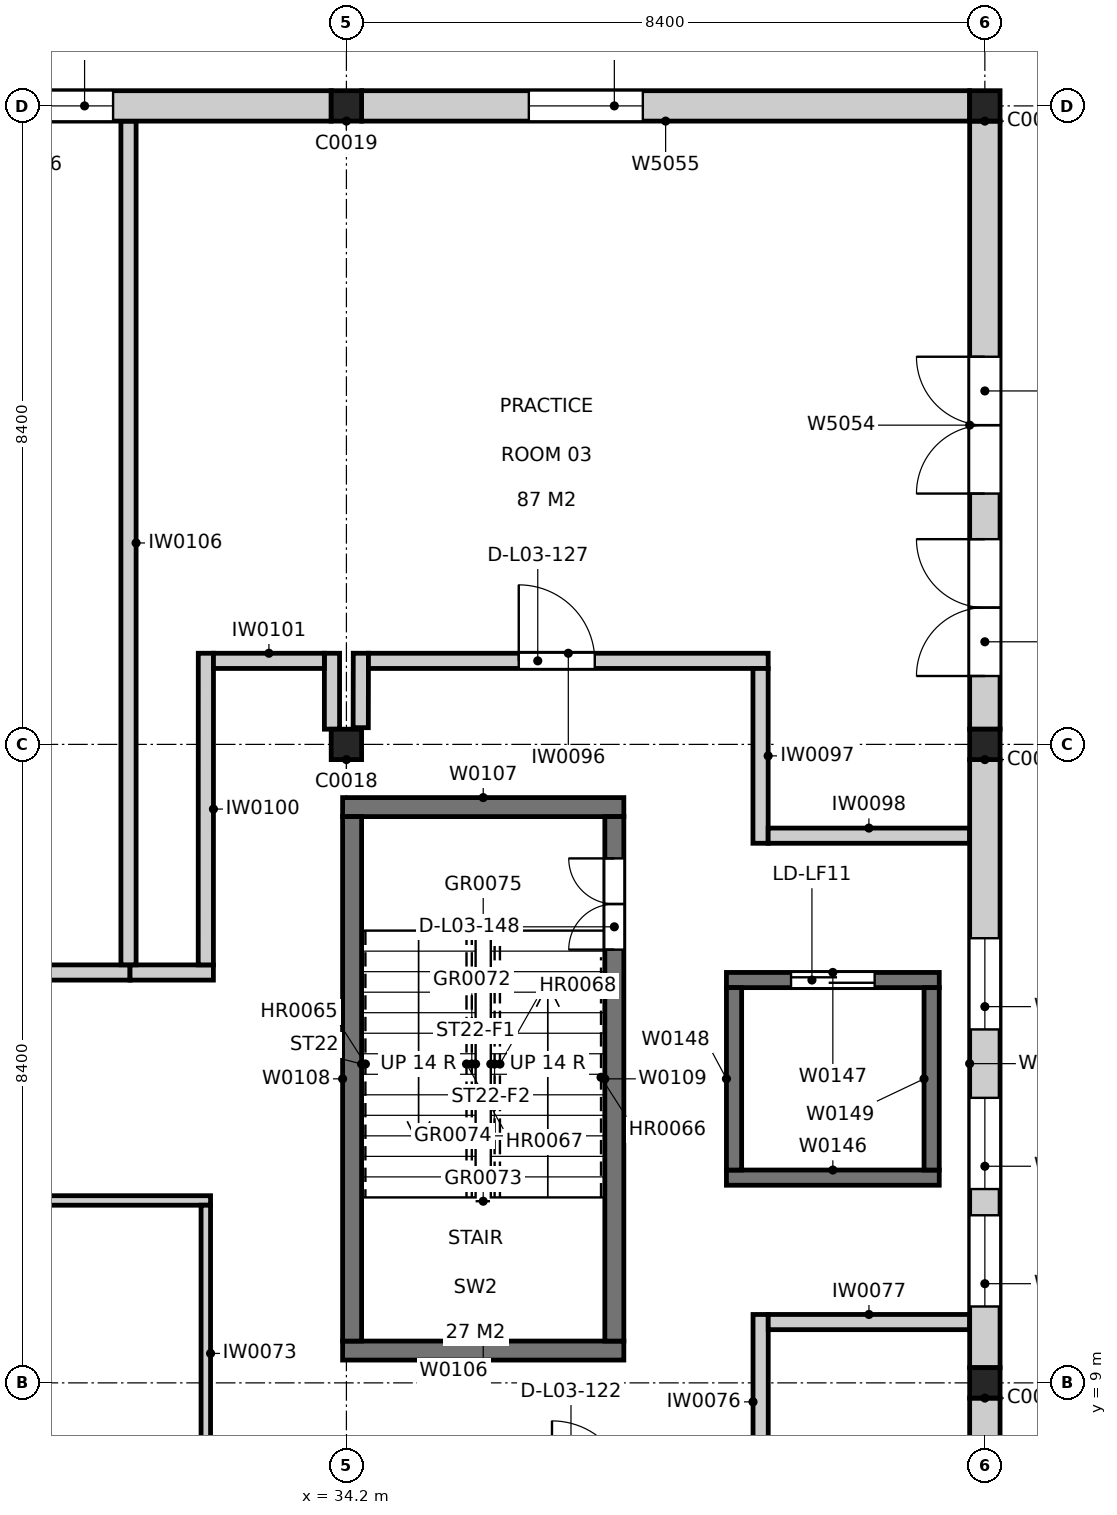
"""IFC4 building model, lengths in metres.
Left out: names, types, materials, properties, quantities, classifications, styles, units other than length and angle.
Written with IfcOpenShell. Run it as: python <this file> out.ifc"""

import sys

from ifc_helpers import new_model, si_unit, direction, frame, frame_2d, origin, origin_2d, place, context, subcontext, project, spatial, rectangle, extrude, element, fill, save


model = new_model("IFC4")
c1 = context("Model", 3, precision=1e-05, world=origin(), true_north=direction((0.0, 1.0)))
c2 = subcontext(c1, "Body", "Model", "MODEL_VIEW")
j1 = project(units=[si_unit("LENGTHUNIT", "METRE"), si_unit("PLANEANGLEUNIT", "RADIAN")], contexts=[c1])
p1 = place(None, origin())
s1 = spatial("IfcSite", under=j1, at=p1, CompositionType="ELEMENT")
p2 = place(p1, origin())
s2 = spatial("IfcBuilding", under=s1, at=p2, CompositionType="ELEMENT")
p3 = place(p2, frame((0.0, 0.0, 14.4)))
s3 = spatial("IfcBuildingStorey", under=s2, at=p3, CompositionType="ELEMENT", Elevation=14.4)
for number, where, z_axis, x_axis in (
    (1, (34.2, 17.4, 0.0), (0.0, 0.0, 1.0), (1.0, 0.0, 0.0)),
    (2, (34.2, 25.8, 0.0), (0.0, 0.0, 1.0), (1.0, 0.0, 0.0)),
    (3, (42.6, 9.0, 0.0), (0.0, 0.0, 1.0), (1.0, 0.0, 0.0)),
    (4, (42.6, 17.4, 0.0), (0.0, 0.0, 1.0), (1.0, 0.0, 0.0)),
    (5, (42.6, 25.8, 0.0), (0.0, 0.0, 1.0), (1.0, 0.0, 0.0)),
):
    element("IfcColumn", number, at=place(p3, frame(where, z_axis=z_axis, x_axis=x_axis)), inside=s3, PredefinedType="COLUMN", context=c2, shape_type="SweptSolid", body=[
        extrude(rectangle(XDim=0.4, YDim=0.4, at=origin_2d()), origin(), (0.0, 0.0, 1.0), 4.8),
    ])
for number, where, z_axis, x_axis in (
    (6, (34.15, 9.425, 0.0), (0.0, 0.0, 1.0), (1.0, 0.0, 0.0)),
    (7, (34.15, 16.575, 0.0), (0.0, 0.0, 1.0), (1.0, 0.0, 0.0)),
):
    element("IfcWall", number, at=place(p3, frame(where, z_axis=z_axis, x_axis=x_axis)), inside=s3, PredefinedType="SOLIDWALL", context=c2, shape_type="SweptSolid", body=[
        extrude(rectangle(XDim=3.7, YDim=0.25, at=frame_2d((1.85, 0.0))), origin(), (0.0, 0.0, 1.0), 4.8),
    ])
p4 = place(p3, frame((34.275, 9.55, 0.0), z_axis=(0.0, 0.0, 1.0), x_axis=(0.0, 1.0, 0.0)))
e8 = element("IfcWall", 8, at=p4, inside=s3, PredefinedType="SOLIDWALL", context=c2, shape_type="SweptSolid", body=[
    extrude(rectangle(XDim=6.9, YDim=0.25, at=frame_2d((3.45, 0.0))), origin(), (0.0, 0.0, 1.0), 4.8),
])
p5 = place(p3, frame((37.725, 9.55, 0.0), z_axis=(0.0, 0.0, 1.0), x_axis=(0.0, 1.0, 0.0)))
e9 = element("IfcWall", 9, at=p5, inside=s3, PredefinedType="SOLIDWALL", context=c2, shape_type="SweptSolid", body=[
    extrude(rectangle(XDim=6.9, YDim=0.25, at=frame_2d((3.45, 0.0))), origin(), (0.0, 0.0, 1.0), 4.8),
])
p6 = place(p5, frame((5.15, 0.0, 0.0)))
e10 = element("IfcOpeningElement", 10, at=p6, cuts=e9, PredefinedType="OPENING", context=c2, shape_type="SweptSolid", body=[
    extrude(rectangle(XDim=1.2, YDim=2.1, at=frame_2d((0.6, 1.05))), frame((0.0, 0.135, 0.0), z_axis=(0.0, -1.0, 0.0), x_axis=(1.0, 0.0, 0.0)), (0.0, 0.0, 1.0), 0.27),
])
p7 = place(p3, frame((39.2, 11.7, 0.0), z_axis=(0.0, 0.0, 1.0), x_axis=(1.0, 0.0, 0.0)))
e11 = element("IfcWall", 11, at=p7, inside=s3, PredefinedType="SOLIDWALL", context=c2, shape_type="SweptSolid", body=[
    extrude(rectangle(XDim=2.8, YDim=0.2, at=frame_2d((1.4, 0.0))), origin(), (0.0, 0.0, 1.0), 4.8),
])
p8 = place(p3, frame((39.2, 14.3, 0.0), z_axis=(0.0, 0.0, 1.0), x_axis=(1.0, 0.0, 0.0)))
e12 = element("IfcWall", 12, at=p8, inside=s3, PredefinedType="SOLIDWALL", context=c2, shape_type="SweptSolid", body=[
    extrude(rectangle(XDim=2.8, YDim=0.2, at=frame_2d((1.4, 0.0))), origin(), (0.0, 0.0, 1.0), 4.8),
])
p9 = place(p8, frame((0.85, 0.0, 0.0)))
e13 = element("IfcOpeningElement", 13, at=p9, cuts=e12, PredefinedType="OPENING", context=c2, shape_type="SweptSolid", body=[
    extrude(rectangle(XDim=1.1, YDim=2.1, at=frame_2d((0.55, 1.05))), frame((0.0, 0.11, 0.0), z_axis=(0.0, -1.0, 0.0), x_axis=(1.0, 0.0, 0.0)), (0.0, 0.0, 1.0), 0.22),
])
for number, where, z_axis, x_axis in (
    (14, (39.3, 11.8, 0.0), (0.0, 0.0, 1.0), (0.0, 1.0, 0.0)),
    (15, (41.9, 11.8, 0.0), (0.0, 0.0, 1.0), (0.0, 1.0, 0.0)),
):
    element("IfcWall", number, at=place(p3, frame(where, z_axis=z_axis, x_axis=x_axis)), inside=s3, PredefinedType="SOLIDWALL", context=c2, shape_type="SweptSolid", body=[
        extrude(rectangle(XDim=2.4, YDim=0.2, at=frame_2d((1.2, 0.0))), origin(), (0.0, 0.0, 1.0), 4.8),
    ])
p10 = place(p3, frame((26.0, 11.4, 0.0), z_axis=(0.0, 0.0, 1.0), x_axis=(1.0, 0.0, 0.0)))
e16 = element("IfcWall", 16, at=p10, inside=s3, PredefinedType="PARTITIONING", context=c2, shape_type="SweptSolid", body=[
    extrude(rectangle(XDim=6.413, YDim=0.125, at=frame_2d((3.206, 0.0))), origin(), (0.0, 0.0, 1.0), 4.64),
])
p11 = place(p10, frame((2.716, 0.0, 0.0)))
e17 = element("IfcOpeningElement", 17, at=p11, cuts=e16, PredefinedType="OPENING", context=c2, shape_type="SweptSolid", body=[
    extrude(rectangle(XDim=1.0, YDim=2.1, at=frame_2d((0.5, 1.05))), frame((0.0, 0.073, 0.0), z_axis=(0.0, -1.0, 0.0), x_axis=(1.0, 0.0, 0.0)), (0.0, 0.0, 1.0), 0.145),
])
p12 = place(p3, frame((32.35, 11.337, 0.0), z_axis=(0.0, 0.0, 1.0), x_axis=(0.0, -1.0, 0.0)))
e18 = element("IfcWall", 18, at=p12, inside=s3, PredefinedType="PARTITIONING", context=c2, shape_type="SweptSolid", body=[
    extrude(rectangle(XDim=3.9, YDim=0.125, at=frame_2d((1.95, 0.0))), origin(), (0.0, 0.0, 1.0), 3.86),
])
p13 = place(p3, frame((39.65, 7.6, 0.0), z_axis=(0.0, 0.0, 1.0), x_axis=(0.0, 1.0, 0.0)))
e19 = element("IfcWall", 19, at=p13, inside=s3, PredefinedType="PARTITIONING", context=c2, shape_type="SweptSolid", body=[
    extrude(rectangle(XDim=2.3, YDim=0.2, at=frame_2d((1.15, 0.0))), origin(), (0.0, 0.0, 1.0), 3.86),
])
p14 = place(p3, frame((39.75, 9.8, 0.0), z_axis=(0.0, 0.0, 1.0), x_axis=(1.0, 0.0, 0.0)))
e20 = element("IfcWall", 20, at=p14, inside=s3, PredefinedType="PARTITIONING", context=c2, shape_type="SweptSolid", body=[
    extrude(rectangle(XDim=2.65, YDim=0.2, at=frame_2d((1.325, 0.0))), origin(), (0.0, 0.0, 1.0), 4.64),
])
p15 = place(p3, frame((23.3, 14.399, 0.0), z_axis=(0.0, 0.0, 1.0), x_axis=(1.0, 0.0, 0.0)))
e21 = element("IfcWall", 21, at=p15, inside=s3, PredefinedType="PARTITIONING", context=c2, shape_type="SweptSolid", body=[
    extrude(rectangle(XDim=8.053, YDim=0.2, at=frame_2d((4.026, 0.0))), origin(), (0.0, 0.0, 1.0), 3.86),
])
p16 = place(p15, frame((1.257, 0.0, 0.0)))
e22 = element("IfcOpeningElement", 22, at=p16, cuts=e21, PredefinedType="OPENING", context=c2, shape_type="SweptSolid", body=[
    extrude(rectangle(XDim=1.0, YDim=2.1, at=frame_2d((0.5, 1.05))), frame((0.0, 0.11, 0.0), z_axis=(0.0, -1.0, 0.0), x_axis=(1.0, 0.0, 0.0)), (0.0, 0.0, 1.0), 0.22),
])
p17 = place(p3, frame((34.01, 18.599, 0.0), z_axis=(0.0, 0.0, 1.0), x_axis=(0.0, -1.0, 0.0)))
e23 = element("IfcWall", 23, at=p17, inside=s3, PredefinedType="PARTITIONING", context=c2, shape_type="SweptSolid", body=[
    extrude(rectangle(XDim=0.999, YDim=0.2, at=frame_2d((0.5, 0.0))), origin(), (0.0, 0.0, 1.0), 3.86),
])
p18 = place(p3, frame((34.388, 17.62, 0.0), z_axis=(0.0, 0.0, 1.0), x_axis=(0.001994511116, 0.999998010961, 0.0)))
e24 = element("IfcWall", 24, at=p18, inside=s3, PredefinedType="PARTITIONING", context=c2, shape_type="SweptSolid", body=[
    extrude(rectangle(XDim=0.979, YDim=0.2, at=frame_2d((0.49, 0.0))), origin(), (0.0, 0.0, 1.0), 3.86),
])
p19 = place(p3, frame((34.49, 18.499, 0.0), z_axis=(0.0, 0.0, 1.0), x_axis=(1.0, 0.0, 0.0)))
e25 = element("IfcWall", 25, at=p19, inside=s3, PredefinedType="PARTITIONING", context=c2, shape_type="SweptSolid", body=[
    extrude(rectangle(XDim=5.259, YDim=0.2, at=frame_2d((2.629, 0.0))), origin(), (0.0, 0.0, 1.0), 4.64),
])
p20 = place(p19, frame((1.978, 0.0, 0.0)))
e26 = element("IfcOpeningElement", 26, at=p20, cuts=e25, PredefinedType="OPENING", context=c2, shape_type="SweptSolid", body=[
    extrude(rectangle(XDim=1.0, YDim=2.1, at=frame_2d((0.5, 1.05))), frame((0.0, 0.11, 0.0), z_axis=(0.0, -1.0, 0.0), x_axis=(1.0, 0.0, 0.0)), (0.0, 0.0, 1.0), 0.22),
])
p21 = place(p3, frame((39.649, 18.399, 0.0), z_axis=(0.0, 0.0, 1.0), x_axis=(0.0, -1.0, 0.0)))
e27 = element("IfcWall", 27, at=p21, inside=s3, PredefinedType="PARTITIONING", context=c2, shape_type="SweptSolid", body=[
    extrude(rectangle(XDim=2.3, YDim=0.2, at=frame_2d((1.15, 0.0))), origin(), (0.0, 0.0, 1.0), 3.86),
])
p22 = place(p3, frame((39.749, 16.199, 0.0), z_axis=(0.0, 0.0, 1.0), x_axis=(1.0, 0.0, 0.0)))
e28 = element("IfcWall", 28, at=p22, inside=s3, PredefinedType="PARTITIONING", context=c2, shape_type="SweptSolid", body=[
    extrude(rectangle(XDim=2.651, YDim=0.2, at=frame_2d((1.326, 0.0))), origin(), (0.0, 0.0, 1.0), 4.64),
])
p23 = place(p3, frame((31.353, 14.399, 0.0), z_axis=(0.0, 0.0, 1.0), x_axis=(1.0, 0.0, 0.0)))
e29 = element("IfcWall", 29, at=p23, inside=s3, PredefinedType="PARTITIONING", context=c2, shape_type="SweptSolid", body=[
    extrude(rectangle(XDim=1.097, YDim=0.2, at=frame_2d((0.548, 0.0))), origin(), (0.0, 0.0, 1.0), 4.06),
])
p24 = place(p3, frame((32.35, 14.499, 0.0), z_axis=(0.0, 0.0, 1.0), x_axis=(0.000238180296, 0.999999971635, 0.0)))
e30 = element("IfcWall", 30, at=p24, inside=s3, PredefinedType="PARTITIONING", context=c2, shape_type="SweptSolid", body=[
    extrude(rectangle(XDim=4.1, YDim=0.2, at=frame_2d((2.05, 0.0))), origin(), (0.0, 0.0, 1.0), 3.86),
])
p25 = place(p3, frame((32.451, 18.499, 0.0), z_axis=(0.0, 0.0, 1.0), x_axis=(1.0, 0.0, 0.0)))
e31 = element("IfcWall", 31, at=p25, inside=s3, PredefinedType="PARTITIONING", context=c2, shape_type="SweptSolid", body=[
    extrude(rectangle(XDim=1.459, YDim=0.2, at=frame_2d((0.729, 0.0))), origin(), (0.0, 0.0, 1.0), 4.64),
])
p26 = place(p3, frame((31.333, 25.6, 0.0), z_axis=(0.0, 0.0, 1.0), x_axis=(0.0, -1.0, 0.0)))
e32 = element("IfcWall", 32, at=p26, inside=s3, PredefinedType="PARTITIONING", context=c2, shape_type="SweptSolid", body=[
    extrude(rectangle(XDim=11.1, YDim=0.2, at=frame_2d((5.55, 0.0))), origin(), (0.0, 0.0, 1.0), 3.86),
])
p27 = place(p3, frame((42.6, 0.8, 0.0), z_axis=(0.0, 0.0, 1.0), x_axis=(0.0, 1.0, 0.0)))
e33 = element("IfcWall", 33, at=p27, inside=s3, PredefinedType="SOLIDWALL", context=c2, shape_type="SweptSolid", body=[
    extrude(rectangle(XDim=8.0, YDim=0.4, at=frame_2d((4.0, 0.0))), origin(), (0.0, 0.0, 1.0), 3.86),
])
p28 = place(p27, frame((2.2, 0.0, 0.9)))
e34 = element("IfcOpeningElement", 34, at=p28, cuts=e33, PredefinedType="OPENING", context=c2, shape_type="SweptSolid", body=[
    extrude(rectangle(XDim=1.5, YDim=1.5, at=frame_2d((0.75, 0.75))), frame((0.0, 0.21, 0.0), z_axis=(0.0, -1.0, 0.0), x_axis=(1.0, 0.0, 0.0)), (0.0, 0.0, 1.0), 0.42),
])
p29 = place(p27, frame((4.3, 0.0, 0.9)))
e35 = element("IfcOpeningElement", 35, at=p29, cuts=e33, PredefinedType="OPENING", context=c2, shape_type="SweptSolid", body=[
    extrude(rectangle(XDim=1.5, YDim=1.5, at=frame_2d((0.75, 0.75))), frame((0.0, 0.21, 0.0), z_axis=(0.0, -1.0, 0.0), x_axis=(1.0, 0.0, 0.0)), (0.0, 0.0, 1.0), 0.42),
])
p30 = place(p3, frame((42.6, 9.2, 0.0), z_axis=(0.0, 0.0, 1.0), x_axis=(0.0, 1.0, 0.0)))
e36 = element("IfcWall", 36, at=p30, inside=s3, PredefinedType="SOLIDWALL", context=c2, shape_type="SweptSolid", body=[
    extrude(rectangle(XDim=8.0, YDim=0.4, at=frame_2d((4.0, 0.0))), origin(), (0.0, 0.0, 1.0), 3.86),
])
p31 = place(p30, frame((0.805, 0.0, 0.9)))
e37 = element("IfcOpeningElement", 37, at=p31, cuts=e36, PredefinedType="OPENING", context=c2, shape_type="SweptSolid", body=[
    extrude(rectangle(XDim=1.2, YDim=2.4, at=frame_2d((0.6, 1.2))), frame((0.0, 0.21, 0.0), z_axis=(0.0, -1.0, 0.0), x_axis=(1.0, 0.0, 0.0)), (0.0, 0.0, 1.0), 0.42),
])
p32 = place(p30, frame((2.35, 0.0, 0.9)))
e38 = element("IfcOpeningElement", 38, at=p32, cuts=e36, PredefinedType="OPENING", context=c2, shape_type="SweptSolid", body=[
    extrude(rectangle(XDim=1.2, YDim=2.4, at=frame_2d((0.6, 1.2))), frame((0.0, 0.21, 0.0), z_axis=(0.0, -1.0, 0.0), x_axis=(1.0, 0.0, 0.0)), (0.0, 0.0, 1.0), 0.42),
])
p33 = place(p30, frame((4.45, 0.0, 0.9)))
e39 = element("IfcOpeningElement", 39, at=p33, cuts=e36, PredefinedType="OPENING", context=c2, shape_type="SweptSolid", body=[
    extrude(rectangle(XDim=1.2, YDim=2.4, at=frame_2d((0.6, 1.2))), frame((0.0, 0.21, 0.0), z_axis=(0.0, -1.0, 0.0), x_axis=(1.0, 0.0, 0.0)), (0.0, 0.0, 1.0), 0.42),
])
p34 = place(p3, frame((42.6, 17.6, 0.0), z_axis=(0.0, 0.0, 1.0), x_axis=(0.0, 1.0, 0.0)))
e40 = element("IfcWall", 40, at=p34, inside=s3, PredefinedType="SOLIDWALL", context=c2, shape_type="SweptSolid", body=[
    extrude(rectangle(XDim=8.0, YDim=0.4, at=frame_2d((4.0, 0.0))), origin(), (0.0, 0.0, 1.0), 3.86),
])
p35 = place(p34, frame((3.1, 0.0, 0.0)))
e41 = element("IfcOpeningElement", 41, at=p35, cuts=e40, PredefinedType="OPENING", context=c2, shape_type="SweptSolid", body=[
    extrude(rectangle(XDim=1.8, YDim=2.4, at=frame_2d((0.9, 1.2))), frame((0.0, 0.21, 0.0), z_axis=(0.0, -1.0, 0.0), x_axis=(1.0, 0.0, 0.0)), (0.0, 0.0, 1.0), 0.42),
])
p36 = place(p34, frame((0.7, 0.0, 0.0)))
e42 = element("IfcOpeningElement", 42, at=p36, cuts=e40, PredefinedType="OPENING", context=c2, shape_type="SweptSolid", body=[
    extrude(rectangle(XDim=1.8, YDim=2.4, at=frame_2d((0.9, 1.2))), frame((0.0, 0.21, 0.0), z_axis=(0.0, -1.0, 0.0), x_axis=(1.0, 0.0, 0.0)), (0.0, 0.0, 1.0), 0.42),
])
p37 = place(p3, frame((42.4, 25.8, 0.0), z_axis=(0.0, 0.0, 1.0), x_axis=(-1.0, 0.0, 0.0)))
e43 = element("IfcWall", 43, at=p37, inside=s3, PredefinedType="SOLIDWALL", context=c2, shape_type="SweptSolid", body=[
    extrude(rectangle(XDim=8.0, YDim=0.4, at=frame_2d((4.0, 0.0))), origin(), (0.0, 0.0, 1.0), 3.86),
])
p38 = place(p37, frame((4.3, 0.0, 0.9)))
e44 = element("IfcOpeningElement", 44, at=p38, cuts=e43, PredefinedType="OPENING", context=c2, shape_type="SweptSolid", body=[
    extrude(rectangle(XDim=1.5, YDim=1.5, at=frame_2d((0.75, 0.75))), frame((0.0, 0.21, 0.0), z_axis=(0.0, -1.0, 0.0), x_axis=(1.0, 0.0, 0.0)), (0.0, 0.0, 1.0), 0.42),
])
p39 = place(p3, frame((34.0, 25.8, 0.0), z_axis=(0.0, 0.0, 1.0), x_axis=(-1.0, 0.0, 0.0)))
e45 = element("IfcWall", 45, at=p39, inside=s3, PredefinedType="SOLIDWALL", context=c2, shape_type="SweptSolid", body=[
    extrude(rectangle(XDim=8.0, YDim=0.4, at=frame_2d((4.0, 0.0))), origin(), (0.0, 0.0, 1.0), 3.86),
])
p40 = place(p39, frame((2.87, 0.0, 0.9)))
e46 = element("IfcOpeningElement", 46, at=p40, cuts=e45, PredefinedType="OPENING", context=c2, shape_type="SweptSolid", body=[
    extrude(rectangle(XDim=1.5, YDim=1.5, at=frame_2d((0.75, 0.75))), frame((0.0, 0.21, 0.0), z_axis=(0.0, -1.0, 0.0), x_axis=(1.0, 0.0, 0.0)), (0.0, 0.0, 1.0), 0.42),
])
p41 = place(p20, origin())
e47 = element("IfcDoor", 47, at=p41, inside=s3, OperationType="SINGLE_SWING_LEFT", PredefinedType="DOOR", context=c2, shape_type="SweptSolid", body=[
    extrude(rectangle(XDim=1.0, YDim=2.1, at=frame_2d((0.5, 1.05))), frame((0.0, 0.025, 0.0), z_axis=(0.0, -1.0, 0.0), x_axis=(1.0, 0.0, 0.0)), (0.0, 0.0, 1.0), 0.05),
])
fill(e26, e47)
p42 = place(p6, origin())
e48 = element("IfcDoor", 48, at=p42, inside=s3, OperationType="DOUBLE_DOOR_SINGLE_SWING", PredefinedType="DOOR", context=c2, shape_type="SweptSolid", body=[
    extrude(rectangle(XDim=1.2, YDim=2.1, at=frame_2d((0.6, 1.05))), frame((0.0, 0.025, 0.0), z_axis=(0.0, -1.0, 0.0), x_axis=(1.0, 0.0, 0.0)), (0.0, 0.0, 1.0), 0.05),
])
fill(e10, e48)
p43 = place(p35, origin())
e49 = element("IfcDoor", 49, at=p43, inside=s3, OperationType="DOUBLE_DOOR_SINGLE_SWING", PredefinedType="DOOR", context=c2, shape_type="SweptSolid", body=[
    extrude(rectangle(XDim=1.8, YDim=2.4, at=frame_2d((0.9, 1.2))), frame((0.0, 0.025, 0.0), z_axis=(0.0, -1.0, 0.0), x_axis=(1.0, 0.0, 0.0)), (0.0, 0.0, 1.0), 0.05),
])
fill(e41, e49)
p44 = place(p36, origin())
e50 = element("IfcDoor", 50, at=p44, inside=s3, OperationType="DOUBLE_DOOR_SINGLE_SWING", PredefinedType="DOOR", context=c2, shape_type="SweptSolid", body=[
    extrude(rectangle(XDim=1.8, YDim=2.4, at=frame_2d((0.9, 1.2))), frame((0.0, 0.025, 0.0), z_axis=(0.0, -1.0, 0.0), x_axis=(1.0, 0.0, 0.0)), (0.0, 0.0, 1.0), 0.05),
])
fill(e42, e50)
p45 = place(p31, origin())
e51 = element("IfcWindow", 51, at=p45, inside=s3, PartitioningType="SINGLE_PANEL", PredefinedType="WINDOW", context=c2, shape_type="SweptSolid", body=[
    extrude(rectangle(XDim=1.2, YDim=2.4, at=frame_2d((0.6, 1.2))), frame((0.0, 0.15, 0.0), z_axis=(0.0, -1.0, 0.0), x_axis=(1.0, 0.0, 0.0)), (0.0, 0.0, 1.0), 0.06),
])
fill(e37, e51)
p46 = place(p32, origin())
e52 = element("IfcWindow", 52, at=p46, inside=s3, PartitioningType="SINGLE_PANEL", PredefinedType="WINDOW", context=c2, shape_type="SweptSolid", body=[
    extrude(rectangle(XDim=1.2, YDim=2.4, at=frame_2d((0.6, 1.2))), frame((0.0, 0.15, 0.0), z_axis=(0.0, -1.0, 0.0), x_axis=(1.0, 0.0, 0.0)), (0.0, 0.0, 1.0), 0.06),
])
fill(e38, e52)
p47 = place(p33, origin())
e53 = element("IfcWindow", 53, at=p47, inside=s3, PartitioningType="SINGLE_PANEL", PredefinedType="WINDOW", context=c2, shape_type="SweptSolid", body=[
    extrude(rectangle(XDim=1.2, YDim=2.4, at=frame_2d((0.6, 1.2))), frame((0.0, 0.15, 0.0), z_axis=(0.0, -1.0, 0.0), x_axis=(1.0, 0.0, 0.0)), (0.0, 0.0, 1.0), 0.06),
])
fill(e39, e53)
p48 = place(p38, origin())
e54 = element("IfcWindow", 54, at=p48, inside=s3, PartitioningType="DOUBLE_PANEL_VERTICAL", PredefinedType="WINDOW", context=c2, shape_type="SweptSolid", body=[
    extrude(rectangle(XDim=1.5, YDim=1.5, at=frame_2d((0.75, 0.75))), frame((0.0, 0.15, 0.0), z_axis=(0.0, -1.0, 0.0), x_axis=(1.0, 0.0, 0.0)), (0.0, 0.0, 1.0), 0.06),
])
fill(e44, e54)
p49 = place(p40, origin())
e55 = element("IfcWindow", 55, at=p49, inside=s3, PartitioningType="DOUBLE_PANEL_VERTICAL", PredefinedType="WINDOW", context=c2, shape_type="SweptSolid", body=[
    extrude(rectangle(XDim=1.5, YDim=1.5, at=frame_2d((0.75, 0.75))), frame((0.0, 0.15, 0.0), z_axis=(0.0, -1.0, 0.0), x_axis=(1.0, 0.0, 0.0)), (0.0, 0.0, 1.0), 0.06),
])
fill(e46, e55)
p50 = place(p9, origin())
e56 = element("IfcDoor", 56, at=p50, inside=s3, OperationType="SLIDING_TO_LEFT", PredefinedType="DOOR", context=c2, shape_type="SweptSolid", body=[
    extrude(rectangle(XDim=1.1, YDim=2.1, at=frame_2d((0.55, 1.05))), frame((0.0, 0.025, 0.0), z_axis=(0.0, -1.0, 0.0), x_axis=(1.0, 0.0, 0.0)), (0.0, 0.0, 1.0), 0.05),
])
fill(e13, e56)
save(model, sys.argv[1])
